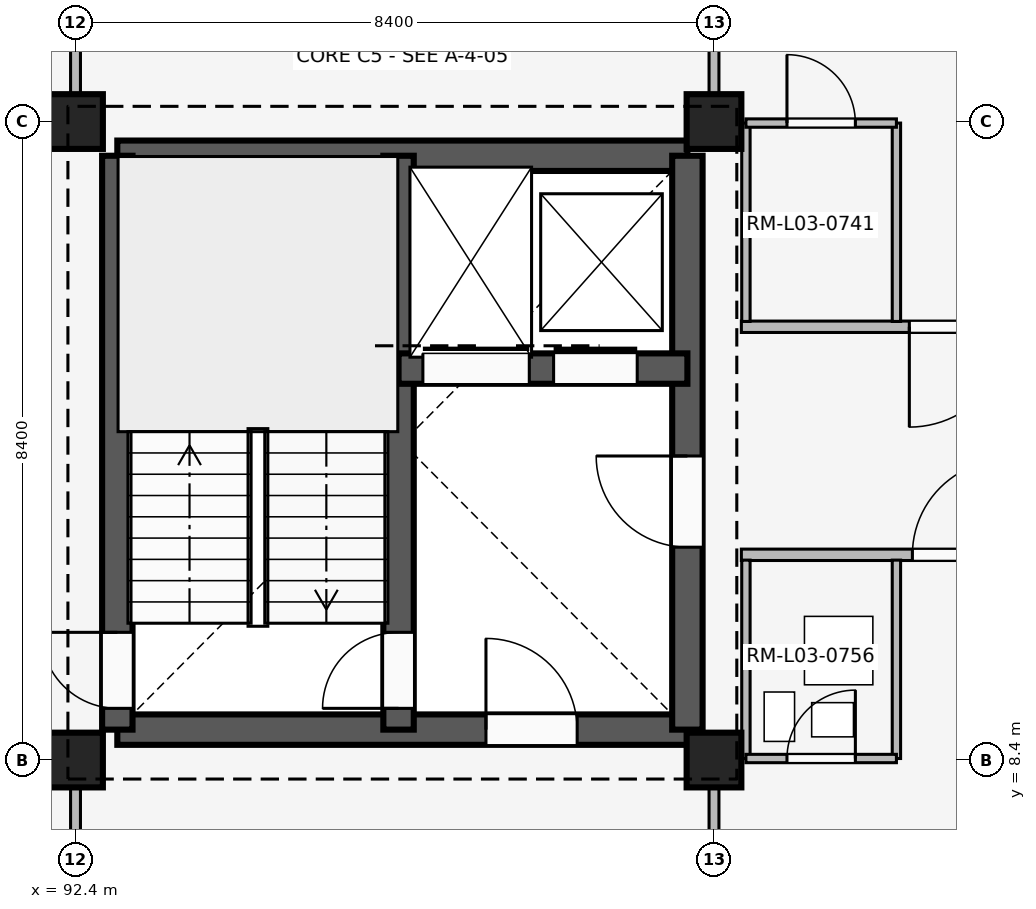
"""IFC4 building model, lengths in metres.
Left out: names, types, materials, properties, quantities, classifications, styles, units other than length and angle.
Written with IfcOpenShell. Run it as: python <this file> out.ifc"""

import sys

from ifc_helpers import new_model, si_unit, direction, frame, frame_2d, origin, origin_2d, place, context, subcontext, project, spatial, rectangle, extrude, element, fill, save


model = new_model("IFC4")
c1 = context("Model", 3, precision=1e-05, world=origin(), true_north=direction((0.0, 1.0)))
c2 = subcontext(c1, "Body", "Model", "MODEL_VIEW")
j1 = project(units=[si_unit("LENGTHUNIT", "METRE"), si_unit("PLANEANGLEUNIT", "RADIAN")], contexts=[c1])
p1 = place(None, origin())
s1 = spatial("IfcSite", under=j1, at=p1, CompositionType="ELEMENT")
p2 = place(p1, origin())
s2 = spatial("IfcBuilding", under=s1, at=p2, CompositionType="ELEMENT")
p3 = place(p2, frame((0.0, 0.0, 12.9)))
s3 = spatial("IfcBuildingStorey", under=s2, at=p3, CompositionType="ELEMENT", Elevation=12.9)
for number, where, z_axis, x_axis in (
    (1, (92.4, 8.4, 0.0), (0.0, 0.0, 1.0), (1.0, 0.0, 0.0)),
    (2, (92.4, 16.8, 0.0), (0.0, 0.0, 1.0), (1.0, 0.0, 0.0)),
    (3, (100.8, 8.4, 0.0), (0.0, 0.0, 1.0), (1.0, 0.0, 0.0)),
    (4, (100.8, 16.8, 0.0), (0.0, 0.0, 1.0), (1.0, 0.0, 0.0)),
):
    element("IfcColumn", number, at=place(p3, frame(where, z_axis=z_axis, x_axis=x_axis)), inside=s3, PredefinedType="COLUMN", context=c2, shape_type="SweptSolid", body=[
        extrude(rectangle(XDim=0.72, YDim=0.72, at=origin_2d()), origin(), (0.0, 0.0, 1.0), 3.3),
    ])
p4 = place(p3, frame((92.95, 8.8, 0.0), z_axis=(0.0, 0.0, 1.0), x_axis=(1.0, 0.0, 0.0)))
e5 = element("IfcWall", 5, at=p4, inside=s3, PredefinedType="SHEAR", context=c2, shape_type="SweptSolid", body=[
    extrude(rectangle(XDim=7.5, YDim=0.4, at=frame_2d((3.75, 0.0))), origin(), (0.0, 0.0, 1.0), 3.02),
])
p5 = place(p4, frame((4.85, 0.0, 0.0)))
e6 = element("IfcOpeningElement", 6, at=p5, cuts=e5, PredefinedType="OPENING", context=c2, shape_type="SweptSolid", body=[
    extrude(rectangle(XDim=1.2, YDim=2.2, at=frame_2d((0.6, 1.1))), frame((0.0, 0.21, 0.0), z_axis=(0.0, -1.0, 0.0), x_axis=(1.0, 0.0, 0.0)), (0.0, 0.0, 1.0), 0.42),
])
p6 = place(p3, frame((92.95, 16.35, 0.0), z_axis=(0.0, 0.0, 1.0), x_axis=(1.0, 0.0, 0.0)))
e7 = element("IfcWall", 7, at=p6, inside=s3, PredefinedType="SHEAR", context=c2, shape_type="SweptSolid", body=[
    extrude(rectangle(XDim=7.5, YDim=0.4, at=frame_2d((3.75, 0.0))), origin(), (0.0, 0.0, 1.0), 3.02),
])
p7 = place(p3, frame((92.95, 8.8, 0.0), z_axis=(0.0, 0.0, 1.0), x_axis=(0.0, 1.0, 0.0)))
e8 = element("IfcWall", 8, at=p7, inside=s3, PredefinedType="SHEAR", context=c2, shape_type="SweptSolid", body=[
    extrude(rectangle(XDim=7.55, YDim=0.4, at=frame_2d((3.775, 0.0))), origin(), (0.0, 0.0, 1.0), 3.02),
])
p8 = place(p7, frame((0.28, 0.0, 0.0)))
e9 = element("IfcOpeningElement", 9, at=p8, cuts=e8, PredefinedType="OPENING", context=c2, shape_type="SweptSolid", body=[
    extrude(rectangle(XDim=1.0, YDim=2.15, at=frame_2d((0.5, 1.075))), frame((0.0, 0.21, 0.0), z_axis=(0.0, -1.0, 0.0), x_axis=(1.0, 0.0, 0.0)), (0.0, 0.0, 1.0), 0.42),
])
p9 = place(p3, frame((100.45, 8.8, 0.0), z_axis=(0.0, 0.0, 1.0), x_axis=(0.0, 1.0, 0.0)))
e10 = element("IfcWall", 10, at=p9, inside=s3, PredefinedType="SHEAR", context=c2, shape_type="SweptSolid", body=[
    extrude(rectangle(XDim=7.55, YDim=0.4, at=frame_2d((3.775, 0.0))), origin(), (0.0, 0.0, 1.0), 3.02),
])
p10 = place(p9, frame((2.4, 0.0, 0.0)))
e11 = element("IfcOpeningElement", 11, at=p10, cuts=e10, PredefinedType="OPENING", context=c2, shape_type="SweptSolid", body=[
    extrude(rectangle(XDim=1.2, YDim=2.2, at=frame_2d((0.6, 1.1))), frame((0.0, 0.21, 0.0), z_axis=(0.0, -1.0, 0.0), x_axis=(1.0, 0.0, 0.0)), (0.0, 0.0, 1.0), 0.42),
])
p11 = place(p3, frame((96.65, 8.8, 0.0), z_axis=(0.0, 0.0, 1.0), x_axis=(0.0, 1.0, 0.0)))
e12 = element("IfcWall", 12, at=p11, inside=s3, PredefinedType="SHEAR", context=c2, shape_type="SweptSolid", body=[
    extrude(rectangle(XDim=7.55, YDim=0.4, at=frame_2d((3.775, 0.0))), origin(), (0.0, 0.0, 1.0), 3.02),
])
p12 = place(p11, frame((0.28, 0.0, 0.0)))
e13 = element("IfcOpeningElement", 13, at=p12, cuts=e12, PredefinedType="OPENING", context=c2, shape_type="SweptSolid", body=[
    extrude(rectangle(XDim=1.0, YDim=2.15, at=frame_2d((0.5, 1.075))), frame((0.0, 0.21, 0.0), z_axis=(0.0, -1.0, 0.0), x_axis=(1.0, 0.0, 0.0)), (0.0, 0.0, 1.0), 0.42),
])
p13 = place(p3, frame((96.65, 13.55, 0.0), z_axis=(0.0, 0.0, 1.0), x_axis=(1.0, 0.0, 0.0)))
e14 = element("IfcWall", 14, at=p13, inside=s3, PredefinedType="SHEAR", context=c2, shape_type="SweptSolid", body=[
    extrude(rectangle(XDim=3.8, YDim=0.4, at=frame_2d((1.9, 0.0))), origin(), (0.0, 0.0, 1.0), 3.02),
])
p14 = place(p13, frame((0.32, 0.0, 0.0)))
e15 = element("IfcOpeningElement", 15, at=p14, cuts=e14, PredefinedType="OPENING", context=c2, shape_type="SweptSolid", body=[
    extrude(rectangle(XDim=1.4, YDim=2.25, at=frame_2d((0.7, 1.125))), frame((0.0, 0.21, 0.0), z_axis=(0.0, -1.0, 0.0), x_axis=(1.0, 0.0, 0.0)), (0.0, 0.0, 1.0), 0.42),
])
p15 = place(p13, frame((2.04, 0.0, 0.0)))
e16 = element("IfcOpeningElement", 16, at=p15, cuts=e14, PredefinedType="OPENING", context=c2, shape_type="SweptSolid", body=[
    extrude(rectangle(XDim=1.1, YDim=2.15, at=frame_2d((0.55, 1.075))), frame((0.0, 0.21, 0.0), z_axis=(0.0, -1.0, 0.0), x_axis=(1.0, 0.0, 0.0)), (0.0, 0.0, 1.0), 0.42),
])
p16 = place(p3, frame((92.4, 0.14, 0.0), z_axis=(0.0, 0.0, 1.0), x_axis=(0.0, 1.0, 0.0)))
e17 = element("IfcWall", 17, at=p16, inside=s3, PredefinedType="PARTITIONING", context=c2, shape_type="SweptSolid", body=[
    extrude(rectangle(XDim=8.21, YDim=0.13, at=frame_2d((4.105, 0.0))), origin(), (0.0, 0.0, 1.0), 2.42),
])
p17 = place(p16, frame((3.64, 0.0, 0.0)))
e18 = element("IfcOpeningElement", 18, at=p17, cuts=e17, PredefinedType="OPENING", context=c2, shape_type="SweptSolid", body=[
    extrude(rectangle(XDim=1.08, YDim=2.15, at=frame_2d((0.54, 1.075))), frame((0.0, 0.075, 0.0), z_axis=(0.0, -1.0, 0.0), x_axis=(1.0, 0.0, 0.0)), (0.0, 0.0, 1.0), 0.15),
])
p18 = place(p3, frame((92.4, 17.15, 0.0), z_axis=(0.0, 0.0, 1.0), x_axis=(0.0, 1.0, 0.0)))
e19 = element("IfcWall", 19, at=p18, inside=s3, PredefinedType="PARTITIONING", context=c2, shape_type="SweptSolid", body=[
    extrude(rectangle(XDim=7.91, YDim=0.13, at=frame_2d((3.955, 0.0))), origin(), (0.0, 0.0, 1.0), 2.42),
])
p19 = place(p18, frame((3.4, 0.0, 0.0)))
e20 = element("IfcOpeningElement", 20, at=p19, cuts=e19, PredefinedType="OPENING", context=c2, shape_type="SweptSolid", body=[
    extrude(rectangle(XDim=1.05, YDim=2.2, at=frame_2d((0.525, 1.1))), frame((0.0, 0.075, 0.0), z_axis=(0.0, -1.0, 0.0), x_axis=(1.0, 0.0, 0.0)), (0.0, 0.0, 1.0), 0.15),
])
p20 = place(p3, frame((100.8, 0.14, 0.0), z_axis=(0.0, 0.0, 1.0), x_axis=(0.0, 1.0, 0.0)))
e21 = element("IfcWall", 21, at=p20, inside=s3, PredefinedType="PARTITIONING", context=c2, shape_type="SweptSolid", body=[
    extrude(rectangle(XDim=8.21, YDim=0.13, at=frame_2d((4.105, 0.0))), origin(), (0.0, 0.0, 1.0), 2.42),
])
p21 = place(p20, frame((3.64, 0.0, 0.0)))
e22 = element("IfcOpeningElement", 22, at=p21, cuts=e21, PredefinedType="OPENING", context=c2, shape_type="SweptSolid", body=[
    extrude(rectangle(XDim=1.08, YDim=2.15, at=frame_2d((0.54, 1.075))), frame((0.0, 0.075, 0.0), z_axis=(0.0, -1.0, 0.0), x_axis=(1.0, 0.0, 0.0)), (0.0, 0.0, 1.0), 0.15),
])
p22 = place(p3, frame((100.8, 17.15, 0.0), z_axis=(0.0, 0.0, 1.0), x_axis=(0.0, 1.0, 0.0)))
e23 = element("IfcWall", 23, at=p22, inside=s3, PredefinedType="PARTITIONING", context=c2, shape_type="SweptSolid", body=[
    extrude(rectangle(XDim=7.91, YDim=0.13, at=frame_2d((3.955, 0.0))), origin(), (0.0, 0.0, 1.0), 2.42),
])
p23 = place(p22, frame((3.4, 0.0, 0.0)))
e24 = element("IfcOpeningElement", 24, at=p23, cuts=e23, PredefinedType="OPENING", context=c2, shape_type="SweptSolid", body=[
    extrude(rectangle(XDim=1.05, YDim=2.2, at=frame_2d((0.525, 1.1))), frame((0.0, 0.075, 0.0), z_axis=(0.0, -1.0, 0.0), x_axis=(1.0, 0.0, 0.0)), (0.0, 0.0, 1.0), 0.15),
])
p24 = place(p3, frame((101.16, 11.1, 0.0), z_axis=(0.0, 0.0, 1.0), x_axis=(1.0, 0.0, 0.0)))
e25 = element("IfcWall", 25, at=p24, inside=s3, PredefinedType="PARTITIONING", context=c2, shape_type="SweptSolid", body=[
    extrude(rectangle(XDim=7.96, YDim=0.15, at=frame_2d((3.98, 0.0))), origin(), (0.0, 0.0, 1.0), 2.42),
])
p25 = place(p24, frame((2.25, 0.0, 0.0)))
e26 = element("IfcOpeningElement", 26, at=p25, cuts=e25, PredefinedType="OPENING", context=c2, shape_type="SweptSolid", body=[
    extrude(rectangle(XDim=1.25, YDim=2.2, at=frame_2d((0.625, 1.1))), frame((0.0, 0.085, 0.0), z_axis=(0.0, -1.0, 0.0), x_axis=(1.0, 0.0, 0.0)), (0.0, 0.0, 1.0), 0.17),
])
p26 = place(p24, frame((5.95, 0.0, 0.0)))
e27 = element("IfcOpeningElement", 27, at=p26, cuts=e25, PredefinedType="OPENING", context=c2, shape_type="SweptSolid", body=[
    extrude(rectangle(XDim=1.25, YDim=2.2, at=frame_2d((0.625, 1.1))), frame((0.0, 0.085, 0.0), z_axis=(0.0, -1.0, 0.0), x_axis=(1.0, 0.0, 0.0)), (0.0, 0.0, 1.0), 0.17),
])
for number, where, z_axis, x_axis in (
    (28, (101.22, 8.42, 0.0), (0.0, 0.0, 1.0), (0.0, 1.0, 0.0)),
    (29, (103.2, 8.42, 0.0), (0.0, 0.0, 1.0), (0.0, 1.0, 0.0)),
):
    element("IfcWall", number, at=place(p3, frame(where, z_axis=z_axis, x_axis=x_axis)), inside=s3, PredefinedType="PARTITIONING", context=c2, shape_type="SweptSolid", body=[
        extrude(rectangle(XDim=2.61, YDim=0.11, at=frame_2d((1.305, 0.0))), origin(), (0.0, 0.0, 1.0), 2.42),
    ])
p27 = place(p3, frame((101.22, 8.42, 0.0), z_axis=(0.0, 0.0, 1.0), x_axis=(1.0, 0.0, 0.0)))
e30 = element("IfcWall", 30, at=p27, inside=s3, PredefinedType="PARTITIONING", context=c2, shape_type="SweptSolid", body=[
    extrude(rectangle(XDim=1.98, YDim=0.11, at=frame_2d((0.99, 0.0))), origin(), (0.0, 0.0, 1.0), 2.42),
])
p28 = place(p27, frame((0.54, 0.0, 0.0)))
e31 = element("IfcOpeningElement", 31, at=p28, cuts=e30, PredefinedType="OPENING", context=c2, shape_type="SweptSolid", body=[
    extrude(rectangle(XDim=0.9, YDim=2.1, at=frame_2d((0.45, 1.05))), frame((0.0, 0.065, 0.0), z_axis=(0.0, -1.0, 0.0), x_axis=(1.0, 0.0, 0.0)), (0.0, 0.0, 1.0), 0.13),
])
p29 = place(p3, frame((109.12, 14.1, 0.0), z_axis=(0.0, 0.0, 1.0), x_axis=(-1.0, 0.0, 0.0)))
e32 = element("IfcWall", 32, at=p29, inside=s3, PredefinedType="PARTITIONING", context=c2, shape_type="SweptSolid", body=[
    extrude(rectangle(XDim=7.96, YDim=0.15, at=frame_2d((3.98, 0.0))), origin(), (0.0, 0.0, 1.0), 2.42),
])
p30 = place(p29, frame((0.73, 0.0, 0.0)))
e33 = element("IfcOpeningElement", 33, at=p30, cuts=e32, PredefinedType="OPENING", context=c2, shape_type="SweptSolid", body=[
    extrude(rectangle(XDim=1.32, YDim=2.25, at=frame_2d((0.66, 1.125))), frame((0.0, 0.085, 0.0), z_axis=(0.0, -1.0, 0.0), x_axis=(1.0, 0.0, 0.0)), (0.0, 0.0, 1.0), 0.17),
])
p31 = place(p29, frame((4.43, 0.0, 0.0)))
e34 = element("IfcOpeningElement", 34, at=p31, cuts=e32, PredefinedType="OPENING", context=c2, shape_type="SweptSolid", body=[
    extrude(rectangle(XDim=1.32, YDim=2.25, at=frame_2d((0.66, 1.125))), frame((0.0, 0.085, 0.0), z_axis=(0.0, -1.0, 0.0), x_axis=(1.0, 0.0, 0.0)), (0.0, 0.0, 1.0), 0.17),
])
for number, where, z_axis, x_axis in (
    (35, (101.22, 14.17, 0.0), (0.0, 0.0, 1.0), (0.0, 1.0, 0.0)),
    (36, (103.2, 14.17, 0.0), (0.0, 0.0, 1.0), (0.0, 1.0, 0.0)),
):
    element("IfcWall", number, at=place(p3, frame(where, z_axis=z_axis, x_axis=x_axis)), inside=s3, PredefinedType="PARTITIONING", context=c2, shape_type="SweptSolid", body=[
        extrude(rectangle(XDim=2.61, YDim=0.11, at=frame_2d((1.305, 0.0))), origin(), (0.0, 0.0, 1.0), 2.42),
    ])
p32 = place(p3, frame((101.22, 16.78, 0.0), z_axis=(0.0, 0.0, 1.0), x_axis=(1.0, 0.0, 0.0)))
e37 = element("IfcWall", 37, at=p32, inside=s3, PredefinedType="PARTITIONING", context=c2, shape_type="SweptSolid", body=[
    extrude(rectangle(XDim=1.98, YDim=0.11, at=frame_2d((0.99, 0.0))), origin(), (0.0, 0.0, 1.0), 2.42),
])
p33 = place(p32, frame((0.54, 0.0, 0.0)))
e38 = element("IfcOpeningElement", 38, at=p33, cuts=e37, PredefinedType="OPENING", context=c2, shape_type="SweptSolid", body=[
    extrude(rectangle(XDim=0.9, YDim=2.1, at=frame_2d((0.45, 1.05))), frame((0.0, 0.065, 0.0), z_axis=(0.0, -1.0, 0.0), x_axis=(1.0, 0.0, 0.0)), (0.0, 0.0, 1.0), 0.13),
])
p34 = place(p10, origin())
e39 = element("IfcDoor", 39, at=p34, inside=s3, OperationType="SINGLE_SWING_RIGHT", PredefinedType="DOOR", context=c2, shape_type="SweptSolid", body=[
    extrude(rectangle(XDim=1.2, YDim=2.2, at=frame_2d((0.6, 1.1))), frame((0.0, 0.025, 0.0), z_axis=(0.0, -1.0, 0.0), x_axis=(1.0, 0.0, 0.0)), (0.0, 0.0, 1.0), 0.05),
])
fill(e11, e39)
p35 = place(p5, origin())
e40 = element("IfcDoor", 40, at=p35, inside=s3, OperationType="SINGLE_SWING_LEFT", PredefinedType="DOOR", context=c2, shape_type="SweptSolid", body=[
    extrude(rectangle(XDim=1.2, YDim=2.2, at=frame_2d((0.6, 1.1))), frame((0.0, 0.025, 0.0), z_axis=(0.0, -1.0, 0.0), x_axis=(1.0, 0.0, 0.0)), (0.0, 0.0, 1.0), 0.05),
])
fill(e6, e40)
p36 = place(p8, origin())
e41 = element("IfcDoor", 41, at=p36, inside=s3, OperationType="SINGLE_SWING_RIGHT", PredefinedType="DOOR", context=c2, shape_type="SweptSolid", body=[
    extrude(rectangle(XDim=1.0, YDim=2.15, at=frame_2d((0.5, 1.075))), frame((0.0, 0.025, 0.0), z_axis=(0.0, -1.0, 0.0), x_axis=(1.0, 0.0, 0.0)), (0.0, 0.0, 1.0), 0.05),
])
fill(e9, e41)
p37 = place(p12, origin())
e42 = element("IfcDoor", 42, at=p37, inside=s3, OperationType="SINGLE_SWING_LEFT", PredefinedType="DOOR", context=c2, shape_type="SweptSolid", body=[
    extrude(rectangle(XDim=1.0, YDim=2.15, at=frame_2d((0.5, 1.075))), frame((0.0, 0.025, 0.0), z_axis=(0.0, -1.0, 0.0), x_axis=(1.0, 0.0, 0.0)), (0.0, 0.0, 1.0), 0.05),
])
fill(e13, e42)
p38 = place(p14, origin())
e43 = element("IfcDoor", 43, at=p38, inside=s3, OperationType="SLIDING_TO_LEFT", PredefinedType="DOOR", context=c2, shape_type="SweptSolid", body=[
    extrude(rectangle(XDim=1.4, YDim=2.25, at=frame_2d((0.7, 1.125))), frame((0.0, 0.025, 0.0), z_axis=(0.0, -1.0, 0.0), x_axis=(1.0, 0.0, 0.0)), (0.0, 0.0, 1.0), 0.05),
])
fill(e15, e43)
p39 = place(p15, origin())
e44 = element("IfcDoor", 44, at=p39, inside=s3, OperationType="SLIDING_TO_LEFT", PredefinedType="DOOR", context=c2, shape_type="SweptSolid", body=[
    extrude(rectangle(XDim=1.1, YDim=2.15, at=frame_2d((0.55, 1.075))), frame((0.0, 0.025, 0.0), z_axis=(0.0, -1.0, 0.0), x_axis=(1.0, 0.0, 0.0)), (0.0, 0.0, 1.0), 0.05),
])
fill(e16, e44)
p40 = place(p25, origin())
e45 = element("IfcDoor", 45, at=p40, inside=s3, OperationType="SINGLE_SWING_RIGHT", PredefinedType="DOOR", context=c2, shape_type="SweptSolid", body=[
    extrude(rectangle(XDim=1.25, YDim=2.2, at=frame_2d((0.625, 1.1))), frame((0.0, 0.025, 0.0), z_axis=(0.0, -1.0, 0.0), x_axis=(1.0, 0.0, 0.0)), (0.0, 0.0, 1.0), 0.05),
])
fill(e26, e45)
p41 = place(p28, origin())
e46 = element("IfcDoor", 46, at=p41, inside=s3, OperationType="SINGLE_SWING_RIGHT", PredefinedType="DOOR", context=c2, shape_type="SweptSolid", body=[
    extrude(rectangle(XDim=0.9, YDim=2.1, at=frame_2d((0.45, 1.05))), frame((0.0, 0.025, 0.0), z_axis=(0.0, -1.0, 0.0), x_axis=(1.0, 0.0, 0.0)), (0.0, 0.0, 1.0), 0.05),
])
fill(e31, e46)
p42 = place(p31, origin())
e47 = element("IfcDoor", 47, at=p42, inside=s3, OperationType="SINGLE_SWING_RIGHT", PredefinedType="DOOR", context=c2, shape_type="SweptSolid", body=[
    extrude(rectangle(XDim=1.32, YDim=2.25, at=frame_2d((0.66, 1.125))), frame((0.0, 0.025, 0.0), z_axis=(0.0, -1.0, 0.0), x_axis=(1.0, 0.0, 0.0)), (0.0, 0.0, 1.0), 0.05),
])
fill(e34, e47)
p43 = place(p33, origin())
e48 = element("IfcDoor", 48, at=p43, inside=s3, OperationType="SINGLE_SWING_LEFT", PredefinedType="DOOR", context=c2, shape_type="SweptSolid", body=[
    extrude(rectangle(XDim=0.9, YDim=2.1, at=frame_2d((0.45, 1.05))), frame((0.0, 0.025, 0.0), z_axis=(0.0, -1.0, 0.0), x_axis=(1.0, 0.0, 0.0)), (0.0, 0.0, 1.0), 0.05),
])
fill(e38, e48)
save(model, sys.argv[1])
